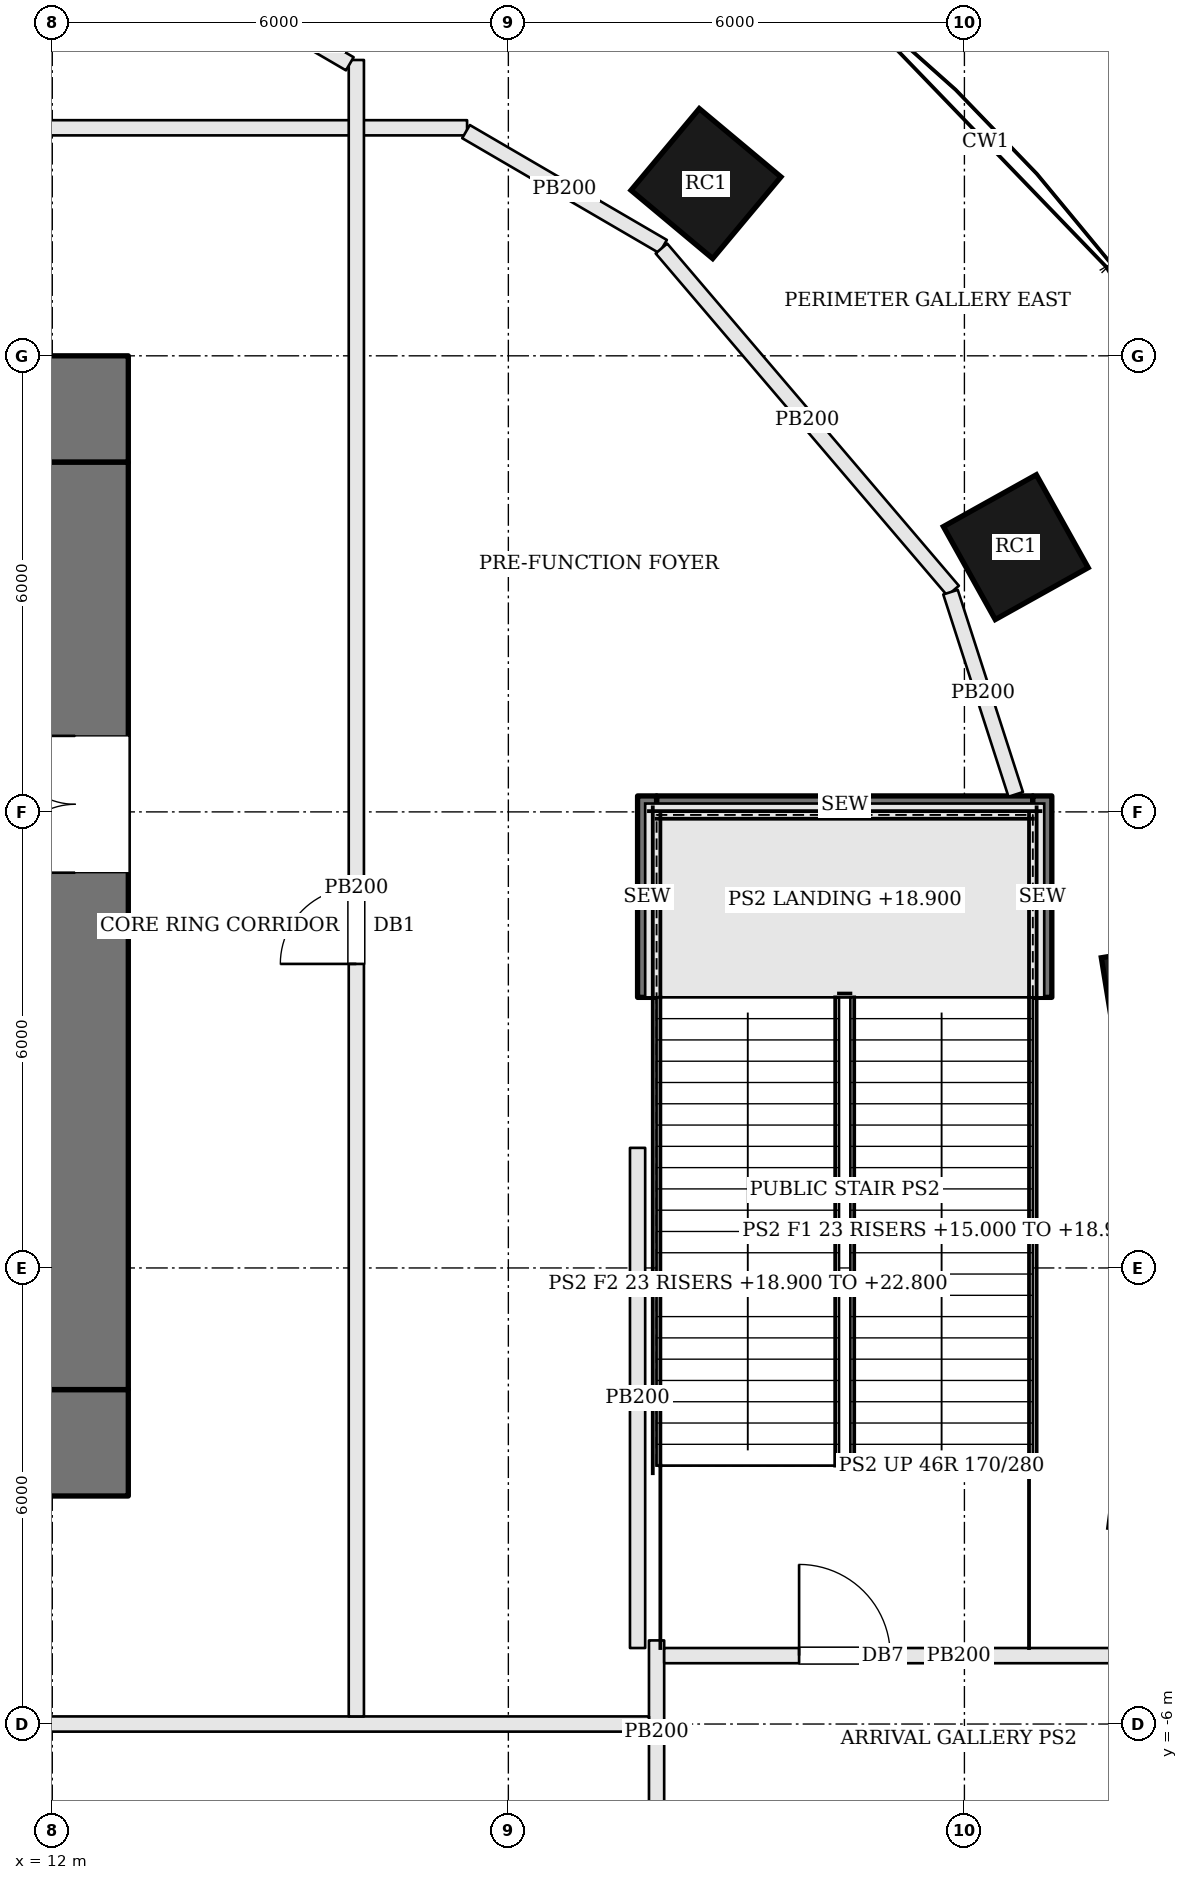
"""IFC4 building model, lengths in metres.
Left out: names, types, materials, properties, quantities, classifications, styles, units other than length and angle.
Written with IfcOpenShell. Run it as: python <this file> out.ifc"""

import sys

from ifc_helpers import new_model, si_unit, direction, frame, frame_2d, origin, origin_2d, place, context, subcontext, project, spatial, rectangle, extrude, element, fill, save


model = new_model("IFC4")
c1 = context("Model", 3, precision=1e-05, world=origin(), true_north=direction((0.0, 1.0)))
c2 = subcontext(c1, "Body", "Model", "MODEL_VIEW")
j1 = project(units=[si_unit("LENGTHUNIT", "METRE"), si_unit("PLANEANGLEUNIT", "RADIAN")], contexts=[c1])
p1 = place(None, origin())
s1 = spatial("IfcSite", under=j1, at=p1, CompositionType="ELEMENT")
p2 = place(p1, origin())
s2 = spatial("IfcBuilding", under=s1, at=p2, CompositionType="ELEMENT")
p3 = place(p2, frame((0.0, 0.0, 15.0)))
s3 = spatial("IfcBuildingStorey", under=s2, at=p3, CompositionType="ELEMENT", Elevation=15.0)
p4 = place(p3, frame((-13.0, 11.3, 0.0), z_axis=(0.0, 0.0, 1.0), x_axis=(1.0, 0.0, 0.0)))
e1 = element("IfcWall", 1, at=p4, inside=s3, PredefinedType="SHEAR", context=c2, shape_type="SweptSolid", body=[
    extrude(rectangle(XDim=26.0, YDim=1.4, at=frame_2d((13.0, 0.0))), origin(), (0.0, 0.0, 1.0), 7.8),
])
p5 = place(p4, frame((8.825, 0.0, 0.0)))
e2 = element("IfcOpeningElement", 2, at=p5, cuts=e1, PredefinedType="OPENING", context=c2, shape_type="SweptSolid", body=[
    extrude(rectangle(XDim=1.0, YDim=2.1, at=frame_2d((0.5, 1.05))), frame((0.0, 0.71, 0.0), z_axis=(0.0, -1.0, 0.0), x_axis=(1.0, 0.0, 0.0)), (0.0, 0.0, 1.0), 1.42),
])
p6 = place(p4, frame((11.425, 0.0, 0.0)))
e3 = element("IfcOpeningElement", 3, at=p6, cuts=e1, PredefinedType="OPENING", context=c2, shape_type="SweptSolid", body=[
    extrude(rectangle(XDim=0.7, YDim=2.1, at=frame_2d((0.35, 1.05))), frame((0.0, 0.71, 0.0), z_axis=(0.0, -1.0, 0.0), x_axis=(1.0, 0.0, 0.0)), (0.0, 0.0, 1.0), 1.42),
])
p7 = place(p4, frame((14.275, 0.0, 0.0)))
e4 = element("IfcOpeningElement", 4, at=p7, cuts=e1, PredefinedType="OPENING", context=c2, shape_type="SweptSolid", body=[
    extrude(rectangle(XDim=0.7, YDim=2.1, at=frame_2d((0.35, 1.05))), frame((0.0, 0.71, 0.0), z_axis=(0.0, -1.0, 0.0), x_axis=(1.0, 0.0, 0.0)), (0.0, 0.0, 1.0), 1.42),
])
p8 = place(p4, frame((16.725, 0.0, 0.0)))
e5 = element("IfcOpeningElement", 5, at=p8, cuts=e1, PredefinedType="OPENING", context=c2, shape_type="SweptSolid", body=[
    extrude(rectangle(XDim=0.7, YDim=2.1, at=frame_2d((0.35, 1.05))), frame((0.0, 0.71, 0.0), z_axis=(0.0, -1.0, 0.0), x_axis=(1.0, 0.0, 0.0)), (0.0, 0.0, 1.0), 1.42),
])
p9 = place(p3, frame((-13.0, -2.3, 0.0), z_axis=(0.0, 0.0, 1.0), x_axis=(1.0, 0.0, 0.0)))
e6 = element("IfcWall", 6, at=p9, inside=s3, PredefinedType="SHEAR", context=c2, shape_type="SweptSolid", body=[
    extrude(rectangle(XDim=26.0, YDim=1.4, at=frame_2d((13.0, 0.0))), origin(), (0.0, 0.0, 1.0), 7.8),
])
p10 = place(p9, frame((9.0, 0.0, 0.0)))
e7 = element("IfcOpeningElement", 7, at=p10, cuts=e6, PredefinedType="OPENING", context=c2, shape_type="SweptSolid", body=[
    extrude(rectangle(XDim=0.9, YDim=2.1, at=frame_2d((0.45, 1.05))), frame((0.0, 0.71, 0.0), z_axis=(0.0, -1.0, 0.0), x_axis=(1.0, 0.0, 0.0)), (0.0, 0.0, 1.0), 1.42),
])
p11 = place(p9, frame((12.225, 0.0, 0.0)))
e8 = element("IfcOpeningElement", 8, at=p11, cuts=e6, PredefinedType="OPENING", context=c2, shape_type="SweptSolid", body=[
    extrude(rectangle(XDim=0.9, YDim=2.1, at=frame_2d((0.45, 1.05))), frame((0.0, 0.71, 0.0), z_axis=(0.0, -1.0, 0.0), x_axis=(1.0, 0.0, 0.0)), (0.0, 0.0, 1.0), 1.42),
])
p12 = place(p9, frame((14.85, 0.0, 0.0)))
e9 = element("IfcOpeningElement", 9, at=p12, cuts=e6, PredefinedType="OPENING", context=c2, shape_type="SweptSolid", body=[
    extrude(rectangle(XDim=0.9, YDim=2.1, at=frame_2d((0.45, 1.05))), frame((0.0, 0.71, 0.0), z_axis=(0.0, -1.0, 0.0), x_axis=(1.0, 0.0, 0.0)), (0.0, 0.0, 1.0), 1.42),
])
p13 = place(p9, frame((16.475, 0.0, 0.0)))
e10 = element("IfcOpeningElement", 10, at=p13, cuts=e6, PredefinedType="OPENING", context=c2, shape_type="SweptSolid", body=[
    extrude(rectangle(XDim=1.0, YDim=2.1, at=frame_2d((0.5, 1.05))), frame((0.0, 0.71, 0.0), z_axis=(0.0, -1.0, 0.0), x_axis=(1.0, 0.0, 0.0)), (0.0, 0.0, 1.0), 1.42),
])
p14 = place(p3, frame((12.3, -1.6, 0.0), z_axis=(0.0, 0.0, 1.0), x_axis=(0.0, 1.0, 0.0)))
e11 = element("IfcWall", 11, at=p14, inside=s3, PredefinedType="SHEAR", context=c2, shape_type="SweptSolid", body=[
    extrude(rectangle(XDim=12.2, YDim=1.4, at=frame_2d((6.1, 0.0))), origin(), (0.0, 0.0, 1.0), 7.8),
])
p15 = place(p14, frame((6.8, 0.0, 0.0)))
e12 = element("IfcOpeningElement", 12, at=p15, cuts=e11, PredefinedType="OPENING", context=c2, shape_type="SweptSolid", body=[
    extrude(rectangle(XDim=1.8, YDim=2.1, at=frame_2d((0.9, 1.05))), frame((0.0, 0.71, 0.0), z_axis=(0.0, -1.0, 0.0), x_axis=(1.0, 0.0, 0.0)), (0.0, 0.0, 1.0), 1.42),
])
for number, where, z_axis, x_axis in (
    (13, (26.605, 3.503, 0.0), (0.0, 0.0, 1.0), (-0.161, 0.987, 0.0)),
    (14, (24.676, 9.483, 0.0), (0.0, 0.0, 1.0), (-0.487, 0.873, 0.0)),
    (15, (20.6, 14.266, 0.0), (0.0, 0.0, 1.0), (-0.767, 0.641, 0.0)),
):
    element("IfcColumn", number, at=place(p3, frame(where, z_axis=z_axis, x_axis=x_axis)), inside=s3, PredefinedType="COLUMN", context=c2, shape_type="SweptSolid", body=[
        extrude(rectangle(XDim=1.4, YDim=1.4, at=origin_2d()), origin(), (0.0, 0.0, 1.0), 7.8),
    ])
p16 = place(p3, frame((19.95, -7.3, 0.0), z_axis=(0.0, 0.0, 1.0), x_axis=(0.0, 1.0, 0.0)))
e16 = element("IfcWall", 16, at=p16, inside=s3, PredefinedType="PARTITIONING", context=c2, shape_type="SweptSolid", body=[
    extrude(rectangle(XDim=2.4, YDim=0.2, at=frame_2d((1.2, 0.0))), origin(), (0.0, 0.0, 1.0), 6.83),
])
p17 = place(p3, frame((20.05, -5.1, 0.0), z_axis=(0.0, 0.0, 1.0), x_axis=(1.0, 0.0, 0.0)))
e17 = element("IfcWall", 17, at=p17, inside=s3, PredefinedType="PARTITIONING", context=c2, shape_type="SweptSolid", body=[
    extrude(rectangle(XDim=7.75, YDim=0.2, at=frame_2d((3.875, 0.0))), origin(), (0.0, 0.0, 1.0), 6.83),
])
p18 = place(p17, frame((1.775, 0.0, 0.0)))
e18 = element("IfcOpeningElement", 18, at=p18, cuts=e17, PredefinedType="OPENING", context=c2, shape_type="SweptSolid", body=[
    extrude(rectangle(XDim=1.2, YDim=2.1, at=frame_2d((0.6, 1.05))), frame((0.0, 0.11, 0.0), z_axis=(0.0, -1.0, 0.0), x_axis=(1.0, 0.0, 0.0)), (0.0, 0.0, 1.0), 0.22),
])
p19 = place(p3, frame((17.457, 15.0, 0.0), z_axis=(0.0, 0.0, 1.0), x_axis=(-1.0, 0.0, 0.0)))
e19 = element("IfcWall", 19, at=p19, inside=s3, PredefinedType="PARTITIONING", context=c2, shape_type="SweptSolid", body=[
    extrude(rectangle(XDim=25.585, YDim=0.2, at=frame_2d((12.792, 0.0))), origin(), (0.0, 0.0, 1.0), 6.83),
])
p20 = place(p19, frame((23.685, 0.0, 0.0)))
e20 = element("IfcOpeningElement", 20, at=p20, cuts=e19, PredefinedType="OPENING", context=c2, shape_type="SweptSolid", body=[
    extrude(rectangle(XDim=1.2, YDim=2.1, at=frame_2d((0.6, 1.05))), frame((0.0, 0.11, 0.0), z_axis=(0.0, -1.0, 0.0), x_axis=(1.0, 0.0, 0.0)), (0.0, 0.0, 1.0), 0.22),
])
p21 = place(p19, frame((19.771, 0.0, 0.0)))
e21 = element("IfcOpeningElement", 21, at=p21, cuts=e19, PredefinedType="OPENING", context=c2, shape_type="SweptSolid", body=[
    extrude(rectangle(XDim=1.0, YDim=2.1, at=frame_2d((0.5, 1.05))), frame((0.0, 0.11, 0.0), z_axis=(0.0, -1.0, 0.0), x_axis=(1.0, 0.0, 0.0)), (0.0, 0.0, 1.0), 0.22),
])
p22 = place(p19, frame((8.957, 0.0, 0.0)))
e22 = element("IfcOpeningElement", 22, at=p22, cuts=e19, PredefinedType="OPENING", context=c2, shape_type="SweptSolid", body=[
    extrude(rectangle(XDim=1.0, YDim=2.1, at=frame_2d((0.5, 1.05))), frame((0.0, 0.11, 0.0), z_axis=(0.0, -1.0, 0.0), x_axis=(1.0, 0.0, 0.0)), (0.0, 0.0, 1.0), 0.22),
])
p23 = place(p3, frame((-19.85, -6.0, 0.0), z_axis=(0.0, 0.0, 1.0), x_axis=(1.0, 0.0, 0.0)))
e23 = element("IfcWall", 23, at=p23, inside=s3, PredefinedType="PARTITIONING", context=c2, shape_type="SweptSolid", body=[
    extrude(rectangle(XDim=39.7, YDim=0.2, at=frame_2d((19.85, 0.0))), origin(), (0.0, 0.0, 1.0), 6.83),
])
p24 = place(p23, frame((13.172, 0.0, 0.0)))
e24 = element("IfcOpeningElement", 24, at=p24, cuts=e23, PredefinedType="OPENING", context=c2, shape_type="SweptSolid", body=[
    extrude(rectangle(XDim=1.2, YDim=2.1, at=frame_2d((0.6, 1.05))), frame((0.0, 0.11, 0.0), z_axis=(0.0, -1.0, 0.0), x_axis=(1.0, 0.0, 0.0)), (0.0, 0.0, 1.0), 0.22),
])
p25 = place(p23, frame((24.211, 0.0, 0.0)))
e25 = element("IfcOpeningElement", 25, at=p25, cuts=e23, PredefinedType="OPENING", context=c2, shape_type="SweptSolid", body=[
    extrude(rectangle(XDim=2.4, YDim=2.4, at=frame_2d((1.2, 1.2))), frame((0.0, 0.11, 0.0), z_axis=(0.0, -1.0, 0.0), x_axis=(1.0, 0.0, 0.0)), (0.0, 0.0, 1.0), 0.22),
])
p26 = place(p23, frame((7.011, 0.0, 0.0)))
e26 = element("IfcOpeningElement", 26, at=p26, cuts=e23, PredefinedType="OPENING", context=c2, shape_type="SweptSolid", body=[
    extrude(rectangle(XDim=2.4, YDim=2.4, at=frame_2d((1.2, 1.2))), frame((0.0, 0.11, 0.0), z_axis=(0.0, -1.0, 0.0), x_axis=(1.0, 0.0, 0.0)), (0.0, 0.0, 1.0), 0.22),
])
p27 = place(p3, frame((17.443, 14.95, 0.0), z_axis=(0.0, 0.0, 1.0), x_axis=(0.863767096464, -0.503891261153, 0.0)))
e27 = element("IfcWall", 27, at=p27, inside=s3, PredefinedType="PARTITIONING", context=c2, shape_type="SweptSolid", body=[
    extrude(rectangle(XDim=3.0, YDim=0.2, at=frame_2d((1.5, 0.0))), origin(), (0.0, 0.0, 1.0), 6.83),
])
p28 = place(p3, frame((20.014, 13.412, 0.0), z_axis=(0.0, 0.0, 1.0), x_axis=(0.648657765017, -0.761080221714, 0.0)))
e28 = element("IfcWall", 28, at=p28, inside=s3, PredefinedType="PARTITIONING", context=c2, shape_type="SweptSolid", body=[
    extrude(rectangle(XDim=5.916, YDim=0.2, at=frame_2d((2.958, 0.0))), origin(), (0.0, 0.0, 1.0), 6.83),
])
p29 = place(p3, frame((23.817, 8.891, 0.0), z_axis=(0.0, 0.0, 1.0), x_axis=(0.306913488124, -0.951737416942, 0.0)))
e29 = element("IfcWall", 29, at=p29, inside=s3, PredefinedType="PARTITIONING", context=c2, shape_type="SweptSolid", body=[
    extrude(rectangle(XDim=2.796, YDim=0.2, at=frame_2d((1.398, 0.0))), origin(), (0.0, 0.0, 1.0), 6.83),
])
p30 = place(p3, frame((19.7, 1.58, 0.0), z_axis=(0.0, 0.0, 1.0), x_axis=(0.0, -1.0, 0.0)))
e30 = element("IfcWall", 30, at=p30, inside=s3, PredefinedType="PARTITIONING", context=c2, shape_type="SweptSolid", body=[
    extrude(rectangle(XDim=6.58, YDim=0.2, at=frame_2d((3.29, 0.0))), origin(), (0.0, 0.0, 1.0), 6.83),
])
p31 = place(p3, frame((16.0, -5.9, 0.0), z_axis=(0.0, 0.0, 1.0), x_axis=(0.0, 1.0, 0.0)))
e31 = element("IfcWall", 31, at=p31, inside=s3, PredefinedType="PARTITIONING", context=c2, shape_type="SweptSolid", body=[
    extrude(rectangle(XDim=21.792, YDim=0.2, at=frame_2d((10.896, 0.0))), origin(), (0.0, 0.0, 1.0), 6.83),
])
p32 = place(p31, frame((9.9, 0.0, 0.0)))
e32 = element("IfcOpeningElement", 32, at=p32, cuts=e31, PredefinedType="OPENING", context=c2, shape_type="SweptSolid", body=[
    extrude(rectangle(XDim=1.0, YDim=2.1, at=frame_2d((0.5, 1.05))), frame((0.0, 0.11, 0.0), z_axis=(0.0, -1.0, 0.0), x_axis=(1.0, 0.0, 0.0)), (0.0, 0.0, 1.0), 0.22),
])
p33 = place(p3, frame((14.846, 16.465, 0.0), z_axis=(0.0, 0.0, 1.0), x_axis=(0.863786061732, -0.503858749609, 0.0)))
e33 = element("IfcWall", 33, at=p33, inside=s3, PredefinedType="PARTITIONING", context=c2, shape_type="SweptSolid", body=[
    extrude(rectangle(XDim=1.237, YDim=0.2, at=frame_2d((0.618, 0.0))), origin(), (0.0, 0.0, 1.0), 6.934),
])
p34 = place(p3, frame((24.9, 6.085, 0.0), z_axis=(0.0, 0.0, 1.0), x_axis=(-1.0, 0.0, 0.0)))
e34 = element("IfcWall", 34, at=p34, inside=s3, PredefinedType="SOLIDWALL", context=c2, shape_type="SweptSolid", body=[
    extrude(rectangle(XDim=4.95, YDim=0.25, at=frame_2d((2.475, 0.0))), origin(), (0.0, 0.0, 1.0), 7.55),
])
for number, where, z_axis, x_axis in (
    (35, (19.825, 3.56, 0.0), (0.0, 0.0, 1.0), (0.0, 1.0, 0.0)),
    (36, (25.025, 3.56, 0.0), (0.0, 0.0, 1.0), (0.0, 1.0, 0.0)),
):
    element("IfcWall", number, at=place(p3, frame(where, z_axis=z_axis, x_axis=x_axis)), inside=s3, PredefinedType="SOLIDWALL", context=c2, shape_type="SweptSolid", body=[
        extrude(rectangle(XDim=2.65, YDim=0.25, at=frame_2d((1.325, 0.0))), origin(), (0.0, 0.0, 1.0), 7.55),
    ])
p35 = place(p15, origin())
e37 = element("IfcDoor", 37, at=p35, inside=s3, OperationType="DOUBLE_DOOR_SINGLE_SWING", PredefinedType="DOOR", context=c2, shape_type="SweptSolid", body=[
    extrude(rectangle(XDim=1.8, YDim=2.1, at=frame_2d((0.9, 1.05))), frame((0.0, 0.025, 0.0), z_axis=(0.0, -1.0, 0.0), x_axis=(1.0, 0.0, 0.0)), (0.0, 0.0, 1.0), 0.05),
])
fill(e12, e37)
p36 = place(p18, origin())
e38 = element("IfcDoor", 38, at=p36, inside=s3, OperationType="SINGLE_SWING_LEFT", PredefinedType="DOOR", context=c2, shape_type="SweptSolid", body=[
    extrude(rectangle(XDim=1.2, YDim=2.1, at=frame_2d((0.6, 1.05))), frame((0.0, 0.025, 0.0), z_axis=(0.0, -1.0, 0.0), x_axis=(1.0, 0.0, 0.0)), (0.0, 0.0, 1.0), 0.05),
])
fill(e18, e38)
p37 = place(p32, origin())
e39 = element("IfcDoor", 39, at=p37, inside=s3, OperationType="SINGLE_SWING_LEFT", PredefinedType="DOOR", context=c2, shape_type="SweptSolid", body=[
    extrude(rectangle(XDim=1.0, YDim=2.1, at=frame_2d((0.5, 1.05))), frame((0.0, 0.025, 0.0), z_axis=(0.0, -1.0, 0.0), x_axis=(1.0, 0.0, 0.0)), (0.0, 0.0, 1.0), 0.05),
])
fill(e32, e39)
save(model, sys.argv[1])
